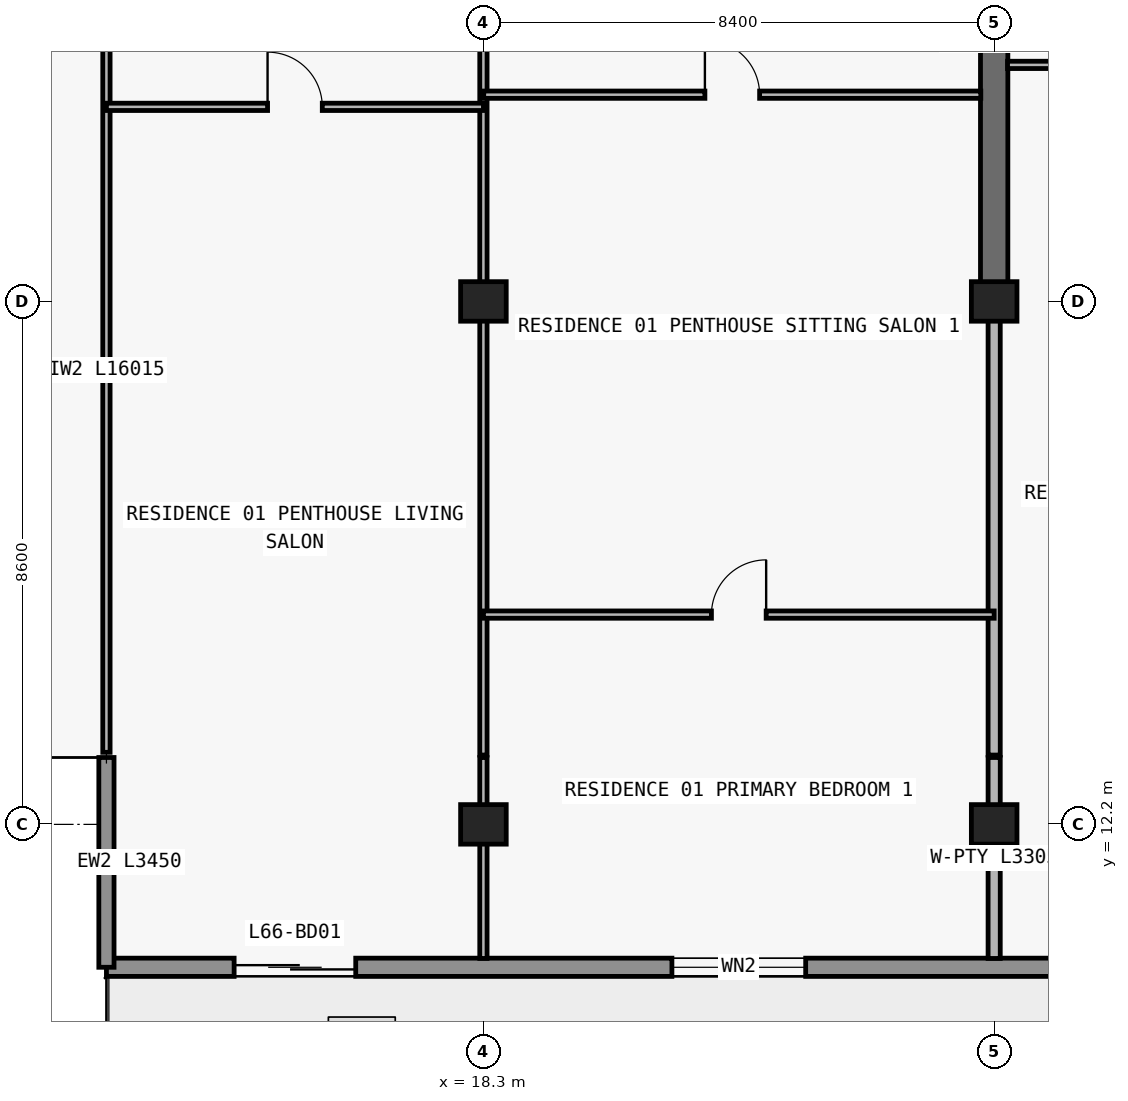
"""IFC4 building model, lengths in metres.
Left out: names, types, materials, properties, quantities, classifications, styles, units other than length and angle.
Written with IfcOpenShell. Run it as: python <this file> out.ifc"""

import sys

from ifc_helpers import new_model, si_unit, direction, frame, frame_2d, origin, origin_2d, place, context, subcontext, project, spatial, rectangle, extrude, element, fill, save


model = new_model("IFC4")
c1 = context("Model", 3, precision=1e-05, world=origin(), true_north=direction((0.0, 1.0)))
c2 = subcontext(c1, "Body", "Model", "MODEL_VIEW")
j1 = project(units=[si_unit("LENGTHUNIT", "METRE"), si_unit("PLANEANGLEUNIT", "RADIAN")], contexts=[c1])
p1 = place(None, origin())
s1 = spatial("IfcSite", under=j1, at=p1, CompositionType="ELEMENT")
p2 = place(p1, origin())
s2 = spatial("IfcBuilding", under=s1, at=p2, CompositionType="ELEMENT")
p3 = place(p2, frame((0.0, 0.0, 236.4)))
s3 = spatial("IfcBuildingStorey", under=s2, at=p3, CompositionType="ELEMENT", Elevation=236.4)
for number, where, z_axis, x_axis in (
    (1, (18.3, 12.2, 0.0), (0.0, 0.0, 1.0), (1.0, 0.0, 0.0)),
    (2, (26.7, 12.2, 0.0), (0.0, 0.0, 1.0), (1.0, 0.0, 0.0)),
    (3, (18.3, 20.8, 0.0), (0.0, 0.0, 1.0), (1.0, 0.0, 0.0)),
    (4, (26.7, 20.8, 0.0), (0.0, 0.0, 1.0), (1.0, 0.0, 0.0)),
):
    element("IfcColumn", number, at=place(p3, frame(where, z_axis=z_axis, x_axis=x_axis)), inside=s3, PredefinedType="COLUMN", context=c2, shape_type="SweptSolid", body=[
        extrude(rectangle(XDim=0.75, YDim=0.65, at=origin_2d()), origin(), (0.0, 0.0, 1.0), 3.05),
    ])
p4 = place(p3, frame((26.7, 20.8, 0.0), z_axis=(0.0, 0.0, 1.0), x_axis=(0.0, 1.0, 0.0)))
e5 = element("IfcWall", 5, at=p4, inside=s3, PredefinedType="SHEAR", context=c2, shape_type="SweptSolid", body=[
    extrude(rectangle(XDim=8.6, YDim=0.45, at=frame_2d((4.3, 0.0))), origin(), (0.0, 0.0, 1.0), 3.05),
])
p5 = place(p3, frame((65.7, 9.85, 0.0), z_axis=(0.0, 0.0, 1.0), x_axis=(-1.0, 0.0, 0.0)))
e6 = element("IfcWall", 6, at=p5, inside=s3, PredefinedType="STANDARD", context=c2, shape_type="SweptSolid", body=[
    extrude(rectangle(XDim=53.6, YDim=0.3, at=frame_2d((26.8, 0.0))), origin(), (0.0, 0.0, 1.0), 3.05),
])
p6 = place(p5, frame((49.5, 0.0, 0.0)))
e7 = element("IfcOpeningElement", 7, at=p6, cuts=e6, PredefinedType="OPENING", context=c2, shape_type="SweptSolid", body=[
    extrude(rectangle(XDim=2.0, YDim=2.3, at=frame_2d((1.0, 1.15))), frame((0.0, 0.16, 0.0), z_axis=(0.0, -1.0, 0.0), x_axis=(1.0, 0.0, 0.0)), (0.0, 0.0, 1.0), 0.32),
])
p7 = place(p5, frame((42.1, 0.0, 0.85)))
e8 = element("IfcOpeningElement", 8, at=p7, cuts=e6, PredefinedType="OPENING", context=c2, shape_type="SweptSolid", body=[
    extrude(rectangle(XDim=2.2, YDim=1.55, at=frame_2d((1.1, 0.775))), frame((0.0, 0.16, 0.0), z_axis=(0.0, -1.0, 0.0), x_axis=(1.0, 0.0, 0.0)), (0.0, 0.0, 1.0), 0.32),
])
p8 = place(p5, frame((35.69, 0.0, 0.0)))
e9 = element("IfcOpeningElement", 9, at=p8, cuts=e6, PredefinedType="OPENING", context=c2, shape_type="SweptSolid", body=[
    extrude(rectangle(XDim=2.0, YDim=2.3, at=frame_2d((1.0, 1.15))), frame((0.0, 0.16, 0.0), z_axis=(0.0, -1.0, 0.0), x_axis=(1.0, 0.0, 0.0)), (0.0, 0.0, 1.0), 0.32),
])
p9 = place(p5, frame((31.59, 0.0, 0.85)))
e10 = element("IfcOpeningElement", 10, at=p9, cuts=e6, PredefinedType="OPENING", context=c2, shape_type="SweptSolid", body=[
    extrude(rectangle(XDim=1.8, YDim=1.55, at=frame_2d((0.9, 0.775))), frame((0.0, 0.16, 0.0), z_axis=(0.0, -1.0, 0.0), x_axis=(1.0, 0.0, 0.0)), (0.0, 0.0, 1.0), 0.32),
])
p10 = place(p5, frame((23.914, 0.0, 0.85)))
e11 = element("IfcOpeningElement", 11, at=p10, cuts=e6, PredefinedType="OPENING", context=c2, shape_type="SweptSolid", body=[
    extrude(rectangle(XDim=2.2, YDim=1.55, at=frame_2d((1.1, 0.775))), frame((0.0, 0.16, 0.0), z_axis=(0.0, -1.0, 0.0), x_axis=(1.0, 0.0, 0.0)), (0.0, 0.0, 1.0), 0.32),
])
p11 = place(p5, frame((19.69, 0.0, 0.0)))
e12 = element("IfcOpeningElement", 12, at=p11, cuts=e6, PredefinedType="OPENING", context=c2, shape_type="SweptSolid", body=[
    extrude(rectangle(XDim=2.0, YDim=2.3, at=frame_2d((1.0, 1.15))), frame((0.0, 0.16, 0.0), z_axis=(0.0, -1.0, 0.0), x_axis=(1.0, 0.0, 0.0)), (0.0, 0.0, 1.0), 0.32),
])
p12 = place(p5, frame((15.59, 0.0, 0.85)))
e13 = element("IfcOpeningElement", 13, at=p12, cuts=e6, PredefinedType="OPENING", context=c2, shape_type="SweptSolid", body=[
    extrude(rectangle(XDim=1.8, YDim=1.55, at=frame_2d((0.9, 0.775))), frame((0.0, 0.16, 0.0), z_axis=(0.0, -1.0, 0.0), x_axis=(1.0, 0.0, 0.0)), (0.0, 0.0, 1.0), 0.32),
])
p13 = place(p5, frame((11.69, 0.0, 0.0)))
e14 = element("IfcOpeningElement", 14, at=p13, cuts=e6, PredefinedType="OPENING", context=c2, shape_type="SweptSolid", body=[
    extrude(rectangle(XDim=2.0, YDim=2.3, at=frame_2d((1.0, 1.15))), frame((0.0, 0.16, 0.0), z_axis=(0.0, -1.0, 0.0), x_axis=(1.0, 0.0, 0.0)), (0.0, 0.0, 1.0), 0.32),
])
p14 = place(p5, frame((7.01, 0.0, 0.65)))
e15 = element("IfcOpeningElement", 15, at=p14, cuts=e6, PredefinedType="OPENING", context=c2, shape_type="SweptSolid", body=[
    extrude(rectangle(XDim=2.6, YDim=1.85, at=frame_2d((1.3, 0.925))), frame((0.0, 0.16, 0.0), z_axis=(0.0, -1.0, 0.0), x_axis=(1.0, 0.0, 0.0)), (0.0, 0.0, 1.0), 0.32),
])
p15 = place(p5, frame((2.0, 0.0, 0.85)))
e16 = element("IfcOpeningElement", 16, at=p15, cuts=e6, PredefinedType="OPENING", context=c2, shape_type="SweptSolid", body=[
    extrude(rectangle(XDim=2.2, YDim=1.55, at=frame_2d((1.1, 0.775))), frame((0.0, 0.16, 0.0), z_axis=(0.0, -1.0, 0.0), x_axis=(1.0, 0.0, 0.0)), (0.0, 0.0, 1.0), 0.32),
])
p16 = place(p3, frame((12.1, 13.3, 0.0), z_axis=(0.0, 0.0, 1.0), x_axis=(0.0, -1.0, 0.0)))
e17 = element("IfcWall", 17, at=p16, inside=s3, PredefinedType="ELEMENTEDWALL", context=c2, shape_type="SweptSolid", body=[
    extrude(rectangle(XDim=3.45, YDim=0.25, at=frame_2d((1.725, 0.0))), origin(), (0.0, 0.0, 1.0), 3.05),
])
p17 = place(p3, frame((12.1, 13.385, 0.0), z_axis=(0.0, 0.0, 1.0), x_axis=(0.0, 1.0, 0.0)))
e18 = element("IfcWall", 18, at=p17, inside=s3, PredefinedType="PARTITIONING", context=c2, shape_type="SweptSolid", body=[
    extrude(rectangle(XDim=16.015, YDim=0.12, at=frame_2d((8.007, 0.0))), origin(), (0.0, 0.0, 1.0), 2.578),
])
p18 = place(p17, frame((12.565, 0.0, 0.0)))
e19 = element("IfcOpeningElement", 19, at=p18, cuts=e18, PredefinedType="OPENING", context=c2, shape_type="SweptSolid", body=[
    extrude(rectangle(XDim=0.9, YDim=2.15, at=frame_2d((0.45, 1.075))), frame((0.0, 0.07, 0.0), z_axis=(0.0, -1.0, 0.0), x_axis=(1.0, 0.0, 0.0)), (0.0, 0.0, 1.0), 0.14),
])
p19 = place(p3, frame((18.3, 9.995, 0.0), z_axis=(0.0, 0.0, 1.0), x_axis=(0.0, 1.0, 0.0)))
e20 = element("IfcWall", 20, at=p19, inside=s3, PredefinedType="PARTITIONING", context=c2, shape_type="SweptSolid", body=[
    extrude(rectangle(XDim=3.305, YDim=0.12, at=frame_2d((1.652, 0.0))), origin(), (0.0, 0.0, 1.0), 2.263),
])
p20 = place(p3, frame((18.3, 13.34, 0.0), z_axis=(0.0, 0.0, 1.0), x_axis=(0.0, 1.0, 0.0)))
e21 = element("IfcWall", 21, at=p20, inside=s3, PredefinedType="PARTITIONING", context=c2, shape_type="SweptSolid", body=[
    extrude(rectangle(XDim=16.06, YDim=0.12, at=frame_2d((8.03, 0.0))), origin(), (0.0, 0.0, 1.0), 2.263),
])
p21 = place(p20, frame((12.61, 0.0, 0.0)))
e22 = element("IfcOpeningElement", 22, at=p21, cuts=e21, PredefinedType="OPENING", context=c2, shape_type="SweptSolid", body=[
    extrude(rectangle(XDim=0.9, YDim=2.15, at=frame_2d((0.45, 1.075))), frame((0.0, 0.07, 0.0), z_axis=(0.0, -1.0, 0.0), x_axis=(1.0, 0.0, 0.0)), (0.0, 0.0, 1.0), 0.14),
])
p22 = place(p3, frame((26.7, 9.995, 0.0), z_axis=(0.0, 0.0, 1.0), x_axis=(0.0, 1.0, 0.0)))
e23 = element("IfcWall", 23, at=p22, inside=s3, PredefinedType="PARTITIONING", context=c2, shape_type="SweptSolid", body=[
    extrude(rectangle(XDim=3.305, YDim=0.2, at=frame_2d((1.652, 0.0))), origin(), (0.0, 0.0, 1.0), 2.263),
])
p23 = place(p3, frame((26.7, 13.34, 0.0), z_axis=(0.0, 0.0, 1.0), x_axis=(0.0, 1.0, 0.0)))
e24 = element("IfcWall", 24, at=p23, inside=s3, PredefinedType="PARTITIONING", context=c2, shape_type="SweptSolid", body=[
    extrude(rectangle(XDim=7.455, YDim=0.2, at=frame_2d((3.728, 0.0))), origin(), (0.0, 0.0, 1.0), 2.263),
])
p24 = place(p3, frame((18.3, 15.65, 0.0), z_axis=(0.0, 0.0, 1.0), x_axis=(1.0, 0.0, 0.0)))
e25 = element("IfcWall", 25, at=p24, inside=s3, PredefinedType="PARTITIONING", context=c2, shape_type="SweptSolid", body=[
    extrude(rectangle(XDim=8.4, YDim=0.12, at=frame_2d((4.2, 0.0))), origin(), (0.0, 0.0, 1.0), 3.05),
])
p25 = place(p24, frame((3.75, 0.0, 0.0)))
e26 = element("IfcOpeningElement", 26, at=p25, cuts=e25, PredefinedType="OPENING", context=c2, shape_type="SweptSolid", body=[
    extrude(rectangle(XDim=0.9, YDim=2.15, at=frame_2d((0.45, 1.075))), frame((0.0, 0.07, 0.0), z_axis=(0.0, -1.0, 0.0), x_axis=(1.0, 0.0, 0.0)), (0.0, 0.0, 1.0), 0.14),
])
p26 = place(p3, frame((12.1, 24.0, 0.0), z_axis=(0.0, 0.0, 1.0), x_axis=(1.0, 0.0, 0.0)))
e27 = element("IfcWall", 27, at=p26, inside=s3, PredefinedType="PARTITIONING", context=c2, shape_type="SweptSolid", body=[
    extrude(rectangle(XDim=6.2, YDim=0.12, at=frame_2d((3.1, 0.0))), origin(), (0.0, 0.0, 1.0), 3.05),
])
p27 = place(p26, frame((2.65, 0.0, 0.0)))
e28 = element("IfcOpeningElement", 28, at=p27, cuts=e27, PredefinedType="OPENING", context=c2, shape_type="SweptSolid", body=[
    extrude(rectangle(XDim=0.9, YDim=2.15, at=frame_2d((0.45, 1.075))), frame((0.0, 0.07, 0.0), z_axis=(0.0, -1.0, 0.0), x_axis=(1.0, 0.0, 0.0)), (0.0, 0.0, 1.0), 0.14),
])
p28 = place(p3, frame((18.305, 24.2, 0.0), z_axis=(0.0, 0.0, 1.0), x_axis=(1.0, 0.0, 0.0)))
e29 = element("IfcWall", 29, at=p28, inside=s3, PredefinedType="PARTITIONING", context=c2, shape_type="SweptSolid", body=[
    extrude(rectangle(XDim=8.175, YDim=0.12, at=frame_2d((4.087, 0.0))), origin(), (0.0, 0.0, 1.0), 3.05),
])
p29 = place(p28, frame((3.637, 0.0, 0.0)))
e30 = element("IfcOpeningElement", 30, at=p29, cuts=e29, PredefinedType="OPENING", context=c2, shape_type="SweptSolid", body=[
    extrude(rectangle(XDim=0.9, YDim=2.15, at=frame_2d((0.45, 1.075))), frame((0.0, 0.07, 0.0), z_axis=(0.0, -1.0, 0.0), x_axis=(1.0, 0.0, 0.0)), (0.0, 0.0, 1.0), 0.14),
])
p30 = place(p3, frame((26.92, 24.69, 0.0), z_axis=(0.0, 0.0, 1.0), x_axis=(1.0, 0.0, 0.0)))
e31 = element("IfcWall", 31, at=p30, inside=s3, PredefinedType="PARTITIONING", context=c2, shape_type="SweptSolid", body=[
    extrude(rectangle(XDim=8.18, YDim=0.12, at=frame_2d((4.09, 0.0))), origin(), (0.0, 0.0, 1.0), 3.05),
])
p31 = place(p30, frame((1.583, 0.0, 0.0)))
e32 = element("IfcOpeningElement", 32, at=p31, cuts=e31, PredefinedType="OPENING", context=c2, shape_type="SweptSolid", body=[
    extrude(rectangle(XDim=0.9, YDim=2.15, at=frame_2d((0.45, 1.075))), frame((0.0, 0.07, 0.0), z_axis=(0.0, -1.0, 0.0), x_axis=(1.0, 0.0, 0.0)), (0.0, 0.0, 1.0), 0.14),
])
p32 = place(p30, frame((5.84, 0.0, 0.0)))
e33 = element("IfcOpeningElement", 33, at=p32, cuts=e31, PredefinedType="OPENING", context=c2, shape_type="SweptSolid", body=[
    extrude(rectangle(XDim=0.9, YDim=2.15, at=frame_2d((0.45, 1.075))), frame((0.0, 0.07, 0.0), z_axis=(0.0, -1.0, 0.0), x_axis=(1.0, 0.0, 0.0)), (0.0, 0.0, 1.0), 0.14),
])
p33 = place(p6, origin())
e34 = element("IfcDoor", 34, at=p33, inside=s3, OperationType="DOUBLE_DOOR_SLIDING", PredefinedType="DOOR", context=c2, shape_type="SweptSolid", body=[
    extrude(rectangle(XDim=2.0, YDim=2.3, at=frame_2d((1.0, 1.15))), frame((0.0, 0.025, 0.0), z_axis=(0.0, -1.0, 0.0), x_axis=(1.0, 0.0, 0.0)), (0.0, 0.0, 1.0), 0.05),
])
fill(e7, e34)
p34 = place(p7, origin())
e35 = element("IfcWindow", 35, at=p34, inside=s3, PartitioningType="SINGLE_PANEL", PredefinedType="WINDOW", context=c2, shape_type="SweptSolid", body=[
    extrude(rectangle(XDim=2.2, YDim=1.55, at=frame_2d((1.1, 0.775))), frame((0.0, 0.03, 0.0), z_axis=(0.0, -1.0, 0.0), x_axis=(1.0, 0.0, 0.0)), (0.0, 0.0, 1.0), 0.06),
])
fill(e8, e35)
p35 = place(p27, origin())
e36 = element("IfcDoor", 36, at=p35, inside=s3, OperationType="SINGLE_SWING_LEFT", PredefinedType="DOOR", context=c2, shape_type="SweptSolid", body=[
    extrude(rectangle(XDim=0.9, YDim=2.15, at=frame_2d((0.45, 1.075))), frame((0.0, 0.025, 0.0), z_axis=(0.0, -1.0, 0.0), x_axis=(1.0, 0.0, 0.0)), (0.0, 0.0, 1.0), 0.05),
])
fill(e28, e36)
p36 = place(p29, origin())
e37 = element("IfcDoor", 37, at=p36, inside=s3, OperationType="SINGLE_SWING_LEFT", PredefinedType="DOOR", context=c2, shape_type="SweptSolid", body=[
    extrude(rectangle(XDim=0.9, YDim=2.15, at=frame_2d((0.45, 1.075))), frame((0.0, 0.025, 0.0), z_axis=(0.0, -1.0, 0.0), x_axis=(1.0, 0.0, 0.0)), (0.0, 0.0, 1.0), 0.05),
])
fill(e30, e37)
p37 = place(p25, origin())
e38 = element("IfcDoor", 38, at=p37, inside=s3, OperationType="SINGLE_SWING_RIGHT", PredefinedType="DOOR", context=c2, shape_type="SweptSolid", body=[
    extrude(rectangle(XDim=0.9, YDim=2.15, at=frame_2d((0.45, 1.075))), frame((0.0, 0.025, 0.0), z_axis=(0.0, -1.0, 0.0), x_axis=(1.0, 0.0, 0.0)), (0.0, 0.0, 1.0), 0.05),
])
fill(e26, e38)
save(model, sys.argv[1])
